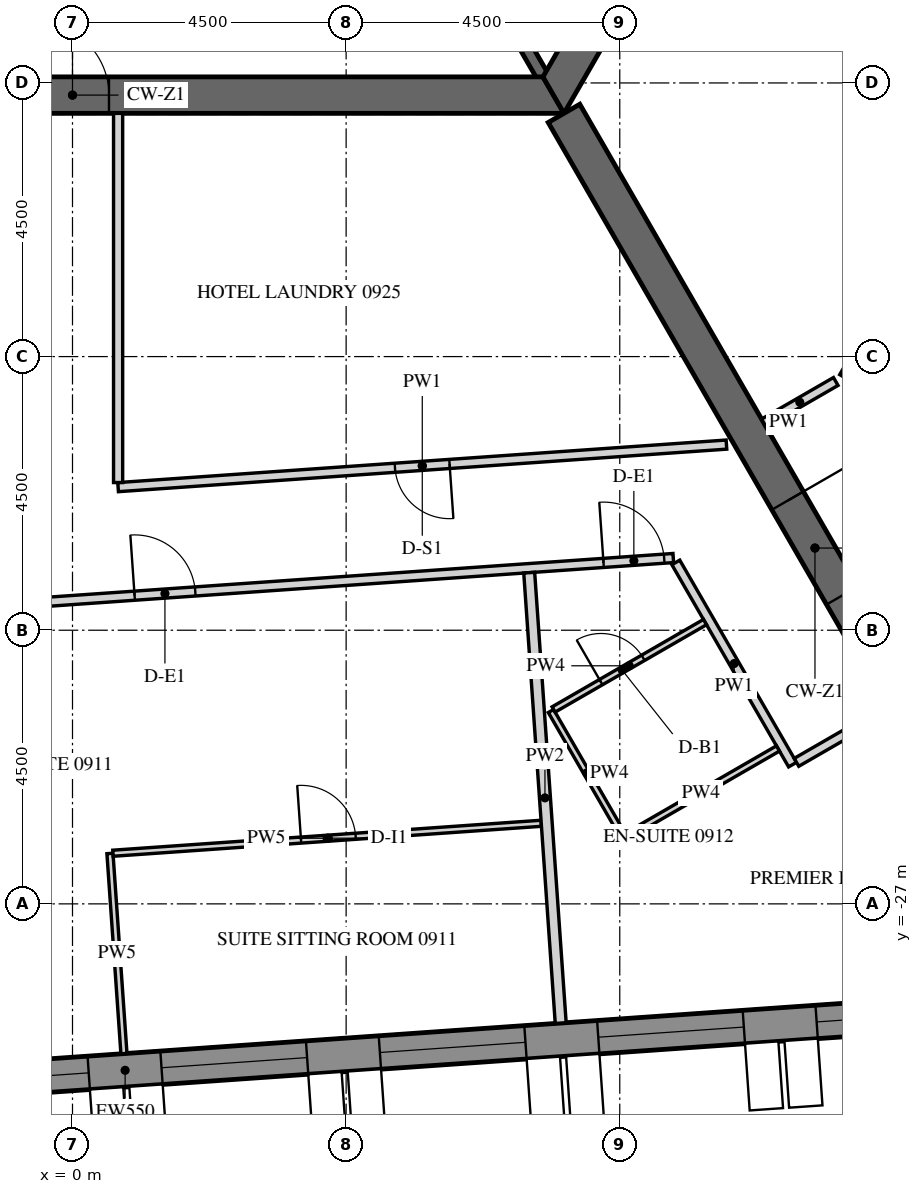
"""IFC4 building model, lengths in metres.
Left out: names, types, materials, properties, quantities, classifications, styles, units other than length and angle.
Written with IfcOpenShell. Run it as: python <this file> out.ifc"""

import sys

from ifc_helpers import new_model, si_unit, direction, frame, frame_2d, origin, place, context, subcontext, project, spatial, polyline, rectangle, outline, extrude, element, fill, save


model = new_model("IFC4")
c1 = context("Model", 3, precision=1e-05, world=origin(), true_north=direction((0.0, 1.0)))
c2 = subcontext(c1, "Body", "Model", "MODEL_VIEW")
j1 = project(units=[si_unit("LENGTHUNIT", "METRE"), si_unit("PLANEANGLEUNIT", "RADIAN")], contexts=[c1])
p1 = place(None, origin())
s1 = spatial("IfcSite", under=j1, at=p1, CompositionType="ELEMENT")
p2 = place(p1, origin())
s2 = spatial("IfcBuilding", under=s1, at=p2, CompositionType="ELEMENT")
p3 = place(p2, frame((0.0, 0.0, 123.3)))
s3 = spatial("IfcBuildingStorey", under=s2, at=p3, CompositionType="ELEMENT", Elevation=123.3)
p4 = place(p3, frame((-14.134, -30.786, -0.15), z_axis=(0.0, 0.0, 1.0), x_axis=(0.997564037441, 0.069756657061, 0.0)))
e1 = element("IfcWall", 1, at=p4, inside=s3, PredefinedType="SOLIDWALL", context=c2, shape_type="SweptSolid", body=[
    extrude(outline(polyline([(-0.026, -0.275), (30.094, -0.275), (30.049, 0.275), (0.026, 0.275), (-0.026, -0.275)])), origin(), (0.0, 0.0, 1.0), 3.9),
])
p5 = place(p4, frame((1.236, 0.0, 1.05)))
e2 = element("IfcOpeningElement", 2, at=p5, cuts=e1, PredefinedType="OPENING", context=c2, shape_type="SweptSolid", body=[
    extrude(rectangle(XDim=2.4, YDim=2.4, at=frame_2d((1.2, 1.2))), frame((0.0, 0.285, 0.0), z_axis=(0.0, -1.0, 0.0), x_axis=(1.0, 0.0, 0.0)), (0.0, 0.0, 1.0), 0.57),
])
p6 = place(p4, frame((4.835, 0.0, 1.05)))
e3 = element("IfcOpeningElement", 3, at=p6, cuts=e1, PredefinedType="OPENING", context=c2, shape_type="SweptSolid", body=[
    extrude(rectangle(XDim=2.4, YDim=2.4, at=frame_2d((1.2, 1.2))), frame((0.0, 0.285, 0.0), z_axis=(0.0, -1.0, 0.0), x_axis=(1.0, 0.0, 0.0)), (0.0, 0.0, 1.0), 0.57),
])
p7 = place(p4, frame((8.436, 0.0, 1.05)))
e4 = element("IfcOpeningElement", 4, at=p7, cuts=e1, PredefinedType="OPENING", context=c2, shape_type="SweptSolid", body=[
    extrude(rectangle(XDim=2.4, YDim=2.4, at=frame_2d((1.2, 1.2))), frame((0.0, 0.285, 0.0), z_axis=(0.0, -1.0, 0.0), x_axis=(1.0, 0.0, 0.0)), (0.0, 0.0, 1.0), 0.57),
])
p8 = place(p4, frame((12.035, 0.0, 1.05)))
e5 = element("IfcOpeningElement", 5, at=p8, cuts=e1, PredefinedType="OPENING", context=c2, shape_type="SweptSolid", body=[
    extrude(rectangle(XDim=2.4, YDim=2.4, at=frame_2d((1.2, 1.2))), frame((0.0, 0.285, 0.0), z_axis=(0.0, -1.0, 0.0), x_axis=(1.0, 0.0, 0.0)), (0.0, 0.0, 1.0), 0.57),
])
p9 = place(p4, frame((15.635, 0.0, 1.05)))
e6 = element("IfcOpeningElement", 6, at=p9, cuts=e1, PredefinedType="OPENING", context=c2, shape_type="SweptSolid", body=[
    extrude(rectangle(XDim=2.4, YDim=2.4, at=frame_2d((1.2, 1.2))), frame((0.0, 0.285, 0.0), z_axis=(0.0, -1.0, 0.0), x_axis=(1.0, 0.0, 0.0)), (0.0, 0.0, 1.0), 0.57),
])
p10 = place(p4, frame((19.236, 0.0, 1.05)))
e7 = element("IfcOpeningElement", 7, at=p10, cuts=e1, PredefinedType="OPENING", context=c2, shape_type="SweptSolid", body=[
    extrude(rectangle(XDim=2.4, YDim=2.4, at=frame_2d((1.2, 1.2))), frame((0.0, 0.285, 0.0), z_axis=(0.0, -1.0, 0.0), x_axis=(1.0, 0.0, 0.0)), (0.0, 0.0, 1.0), 0.57),
])
p11 = place(p4, frame((22.835, 0.0, 1.05)))
e8 = element("IfcOpeningElement", 8, at=p11, cuts=e1, PredefinedType="OPENING", context=c2, shape_type="SweptSolid", body=[
    extrude(rectangle(XDim=2.4, YDim=2.4, at=frame_2d((1.2, 1.2))), frame((0.0, 0.285, 0.0), z_axis=(0.0, -1.0, 0.0), x_axis=(1.0, 0.0, 0.0)), (0.0, 0.0, 1.0), 0.57),
])
p12 = place(p4, frame((26.436, 0.0, 1.05)))
e9 = element("IfcOpeningElement", 9, at=p12, cuts=e1, PredefinedType="OPENING", context=c2, shape_type="SweptSolid", body=[
    extrude(rectangle(XDim=2.4, YDim=2.4, at=frame_2d((1.2, 1.2))), frame((0.0, 0.285, 0.0), z_axis=(0.0, -1.0, 0.0), x_axis=(1.0, 0.0, 0.0)), (0.0, 0.0, 1.0), 0.57),
])
p13 = place(p3, frame((-7.91, -13.7, -0.15), z_axis=(0.0, 0.0, 1.0), x_axis=(1.0, 0.0, 0.0)))
e10 = element("IfcWall", 10, at=p13, inside=s3, PredefinedType="SHEAR", context=c2, shape_type="SweptSolid", body=[
    extrude(outline(polyline([(-0.173, -0.3), (15.993, -0.3), (15.646, 0.3), (0.173, 0.3), (-0.173, -0.3)])), origin(), (0.0, 0.0, 1.0), 3.9),
])
p14 = place(p13, frame((7.31, 0.0, 0.15)))
e11 = element("IfcOpeningElement", 11, at=p14, cuts=e10, PredefinedType="OPENING", context=c2, shape_type="SweptSolid", body=[
    extrude(rectangle(XDim=1.2, YDim=2.4, at=frame_2d((0.6, 1.2))), frame((0.0, 0.31, 0.0), z_axis=(0.0, -1.0, 0.0), x_axis=(1.0, 0.0, 0.0)), (0.0, 0.0, 1.0), 0.62),
])
p15 = place(p3, frame((7.91, -13.7, -0.15), z_axis=(0.0, 0.0, 1.0), x_axis=(0.499999880136, 0.866025472988, 0.0)))
e12 = element("IfcWall", 12, at=p15, inside=s3, PredefinedType="SHEAR", context=c2, shape_type="SweptSolid", body=[
    extrude(outline(polyline([(-0.173, -0.3), (15.993, -0.3), (15.646, 0.3), (0.173, 0.3), (-0.173, -0.3)])), origin(), (0.0, 0.0, 1.0), 3.9),
])
p16 = place(p15, frame((7.039, 0.0, 0.15)))
e13 = element("IfcOpeningElement", 13, at=p16, cuts=e12, PredefinedType="OPENING", context=c2, shape_type="SweptSolid", body=[
    extrude(rectangle(XDim=1.8, YDim=2.4, at=frame_2d((0.9, 1.2))), frame((0.0, 0.31, 0.0), z_axis=(0.0, -1.0, 0.0), x_axis=(1.0, 0.0, 0.0)), (0.0, 0.0, 1.0), 0.62),
])
p17 = place(p3, frame((8.083, -14.0, -0.15), z_axis=(0.0, 0.0, 1.0), x_axis=(0.499997680643, -0.866026742862, 0.0)))
e14 = element("IfcWall", 14, at=p17, inside=s3, PredefinedType="SHEAR", context=c2, shape_type="SweptSolid", body=[
    extrude(rectangle(XDim=16.509, YDim=0.6, at=frame_2d((8.254, 0.0))), origin(), (0.0, 0.0, 1.0), 3.9),
])
p18 = place(p17, frame((7.354, 0.0, 0.15)))
e15 = element("IfcOpeningElement", 15, at=p18, cuts=e14, PredefinedType="OPENING", context=c2, shape_type="SweptSolid", body=[
    extrude(rectangle(XDim=1.8, YDim=2.4, at=frame_2d((0.9, 1.2))), frame((0.0, 0.31, 0.0), z_axis=(0.0, -1.0, 0.0), x_axis=(1.0, 0.0, 0.0)), (0.0, 0.0, 1.0), 0.62),
])
p19 = place(p3, frame((5.773, -10.0, -0.15), z_axis=(0.0, 0.0, 1.0), x_axis=(0.500038251005, -0.86600331843, 0.0)))
e16 = element("IfcWall", 16, at=p19, inside=s3, PredefinedType="SHEAR", context=c2, shape_type="SweptSolid", body=[
    extrude(rectangle(XDim=3.926, YDim=0.2, at=frame_2d((1.963, 0.0))), origin(), (0.0, 0.0, 1.0), 3.9),
])
p20 = place(p3, frame((-12.068, -22.847, 0.0), z_axis=(0.0, 0.0, 1.0), x_axis=(0.99756437486, 0.069751831595, 0.0)))
e17 = element("IfcWall", 17, at=p20, inside=s3, PredefinedType="PARTITIONING", context=c2, shape_type="SweptSolid", body=[
    extrude(rectangle(XDim=22.002, YDim=0.15, at=frame_2d((11.001, 0.0))), origin(), (0.0, 0.0, 1.0), 2.988),
])
p21 = place(p20, frame((3.169, 0.0, 0.0)))
e18 = element("IfcOpeningElement", 18, at=p21, cuts=e17, PredefinedType="OPENING", context=c2, shape_type="SweptSolid", body=[
    extrude(rectangle(XDim=1.0, YDim=2.1, at=frame_2d((0.5, 1.05))), frame((0.0, 0.085, 0.0), z_axis=(0.0, -1.0, 0.0), x_axis=(1.0, 0.0, 0.0)), (0.0, 0.0, 1.0), 0.17),
])
p22 = place(p20, frame((13.121, 0.0, 0.0)))
e19 = element("IfcOpeningElement", 19, at=p22, cuts=e17, PredefinedType="OPENING", context=c2, shape_type="SweptSolid", body=[
    extrude(rectangle(XDim=1.0, YDim=2.1, at=frame_2d((0.5, 1.05))), frame((0.0, 0.085, 0.0), z_axis=(0.0, -1.0, 0.0), x_axis=(1.0, 0.0, 0.0)), (0.0, 0.0, 1.0), 0.17),
])
p23 = place(p20, frame((20.852, 0.0, 0.0)))
e20 = element("IfcOpeningElement", 20, at=p23, cuts=e17, PredefinedType="OPENING", context=c2, shape_type="SweptSolid", body=[
    extrude(rectangle(XDim=1.0, YDim=2.1, at=frame_2d((0.5, 1.05))), frame((0.0, 0.085, 0.0), z_axis=(0.0, -1.0, 0.0), x_axis=(1.0, 0.0, 0.0)), (0.0, 0.0, 1.0), 0.17),
])
p24 = place(p3, frame((9.922, -21.385, 0.0), z_axis=(0.0, 0.0, 1.0), x_axis=(0.500003180287, -0.866023567637, 0.0)))
e21 = element("IfcWall", 21, at=p24, inside=s3, PredefinedType="PARTITIONING", context=c2, shape_type="SweptSolid", body=[
    extrude(rectangle(XDim=3.839, YDim=0.15, at=frame_2d((1.92, 0.0))), origin(), (0.0, 0.0, 1.0), 2.988),
])
p25 = place(p3, frame((11.906, -24.673, 0.0), z_axis=(0.0, 0.0, 1.0), x_axis=(0.866013532718, 0.500020560727, 0.0)))
e22 = element("IfcWall", 22, at=p25, inside=s3, PredefinedType="PARTITIONING", context=c2, shape_type="SweptSolid", body=[
    extrude(rectangle(XDim=1.725, YDim=0.15, at=frame_2d((0.863, 0.0))), origin(), (0.0, 0.0, 1.0), 2.988),
])
p26 = place(p3, frame((10.754, -19.447, 0.0), z_axis=(0.0, 0.0, 1.0), x_axis=(-0.997564830966, -0.069745308232, 0.0)))
e23 = element("IfcWall", 23, at=p26, inside=s3, PredefinedType="PARTITIONING", context=c2, shape_type="SweptSolid", body=[
    extrude(rectangle(XDim=10.029, YDim=0.15, at=frame_2d((5.014, 0.0))), origin(), (0.0, 0.0, 1.0), 2.988),
])
p27 = place(p26, frame((4.564, 0.0, 0.0)))
e24 = element("IfcOpeningElement", 24, at=p27, cuts=e23, PredefinedType="OPENING", context=c2, shape_type="SweptSolid", body=[
    extrude(rectangle(XDim=0.9, YDim=2.1, at=frame_2d((0.45, 1.05))), frame((0.0, 0.085, 0.0), z_axis=(0.0, -1.0, 0.0), x_axis=(1.0, 0.0, 0.0)), (0.0, 0.0, 1.0), 0.17),
])
p28 = place(p3, frame((0.75, -20.072, 0.0), z_axis=(0.0, 0.0, 1.0), x_axis=(0.0, 1.0, 0.0)))
e25 = element("IfcWall", 25, at=p28, inside=s3, PredefinedType="PARTITIONING", context=c2, shape_type="SweptSolid", body=[
    extrude(rectangle(XDim=6.072, YDim=0.15, at=frame_2d((3.036, 0.0))), origin(), (0.0, 0.0, 1.0), 2.988),
])
p29 = place(p3, frame((16.902, -11.024, 0.0), z_axis=(0.0, 0.0, 1.0), x_axis=(-0.499999527968, -0.866025676312, 0.0)))
e26 = element("IfcWall", 26, at=p29, inside=s3, PredefinedType="PARTITIONING", context=c2, shape_type="SweptSolid", body=[
    extrude(rectangle(XDim=8.441, YDim=0.15, at=frame_2d((4.22, 0.0))), origin(), (0.0, 0.0, 1.0), 2.988),
])
p30 = place(p29, frame((3.771, 0.0, 0.0)))
e27 = element("IfcOpeningElement", 27, at=p30, cuts=e26, PredefinedType="OPENING", context=c2, shape_type="SweptSolid", body=[
    extrude(rectangle(XDim=0.9, YDim=2.1, at=frame_2d((0.45, 1.05))), frame((0.0, 0.085, 0.0), z_axis=(0.0, -1.0, 0.0), x_axis=(1.0, 0.0, 0.0)), (0.0, 0.0, 1.0), 0.17),
])
p31 = place(p3, frame((12.552, -18.409, 0.0), z_axis=(0.0, 0.0, 1.0), x_axis=(-0.866078408764, -0.499908181442, 0.0)))
e28 = element("IfcWall", 28, at=p31, inside=s3, PredefinedType="PARTITIONING", context=c2, shape_type="SweptSolid", body=[
    extrude(rectangle(XDim=1.365, YDim=0.15, at=frame_2d((0.683, 0.0))), origin(), (0.0, 0.0, 1.0), 2.988),
])
p32 = place(p3, frame((0.846, -29.463, 0.0), z_axis=(0.0, 0.0, 1.0), x_axis=(-0.069769490542, 0.997563139951, 0.0)))
e29 = element("IfcWall", 29, at=p32, inside=s3, PredefinedType="PARTITIONING", context=c2, shape_type="SweptSolid", body=[
    extrude(rectangle(XDim=3.3, YDim=0.1, at=frame_2d((1.65, 0.0))), origin(), (0.0, 0.0, 1.0), 2.988),
])
p33 = place(p3, frame((0.666, -26.167, 0.0), z_axis=(0.0, 0.0, 1.0), x_axis=(0.997564648601, 0.069747916536, 0.0)))
e30 = element("IfcWall", 30, at=p33, inside=s3, PredefinedType="PARTITIONING", context=c2, shape_type="SweptSolid", body=[
    extrude(rectangle(XDim=7.06, YDim=0.1, at=frame_2d((3.53, 0.0))), origin(), (0.0, 0.0, 1.0), 2.988),
])
p34 = place(p33, frame((3.1, 0.0, 0.0)))
e31 = element("IfcOpeningElement", 31, at=p34, cuts=e30, PredefinedType="OPENING", context=c2, shape_type="SweptSolid", body=[
    extrude(rectangle(XDim=0.9, YDim=2.1, at=frame_2d((0.45, 1.05))), frame((0.0, 0.06, 0.0), z_axis=(0.0, -1.0, 0.0), x_axis=(1.0, 0.0, 0.0)), (0.0, 0.0, 1.0), 0.12),
])
p35 = place(p3, frame((8.029, -28.96, 0.0), z_axis=(0.0, 0.0, 1.0), x_axis=(-0.069739801019, 0.99756521599, 0.0)))
e32 = element("IfcWall", 32, at=p35, inside=s3, PredefinedType="PARTITIONING", context=c2, shape_type="SweptSolid", body=[
    extrude(rectangle(XDim=7.425, YDim=0.18, at=frame_2d((3.712, 0.0))), origin(), (0.0, 0.0, 1.0), 2.988),
])
p36 = place(p3, frame((11.602, -24.445, 0.0), z_axis=(0.0, 0.0, 1.0), x_axis=(-0.866046596414, -0.499963291492, 0.0)))
e33 = element("IfcWall", 33, at=p36, inside=s3, PredefinedType="PARTITIONING", context=c2, shape_type="SweptSolid", body=[
    extrude(rectangle(XDim=2.925, YDim=0.1, at=frame_2d((1.462, 0.0))), origin(), (0.0, 0.0, 1.0), 2.988),
])
p37 = place(p3, frame((9.043, -25.864, 0.0), z_axis=(0.0, 0.0, 1.0), x_axis=(-0.500016218704, 0.866016039709, 0.0)))
e34 = element("IfcWall", 34, at=p37, inside=s3, PredefinedType="PARTITIONING", context=c2, shape_type="SweptSolid", body=[
    extrude(rectangle(XDim=2.35, YDim=0.1, at=frame_2d((1.175, 0.0))), origin(), (0.0, 0.0, 1.0), 2.988),
])
p38 = place(p3, frame((7.912, -23.803, 0.0), z_axis=(0.0, 0.0, 1.0), x_axis=(0.866039941686, 0.499974818771, 0.0)))
e35 = element("IfcWall", 35, at=p38, inside=s3, PredefinedType="PARTITIONING", context=c2, shape_type="SweptSolid", body=[
    extrude(rectangle(XDim=2.875, YDim=0.1, at=frame_2d((1.438, 0.0))), origin(), (0.0, 0.0, 1.0), 2.988),
])
p39 = place(p38, frame((0.9, 0.0, 0.0)))
e36 = element("IfcOpeningElement", 36, at=p39, cuts=e35, PredefinedType="OPENING", context=c2, shape_type="SweptSolid", body=[
    extrude(rectangle(XDim=0.8, YDim=2.1, at=frame_2d((0.4, 1.05))), frame((0.0, 0.06, 0.0), z_axis=(0.0, -1.0, 0.0), x_axis=(1.0, 0.0, 0.0)), (0.0, 0.0, 1.0), 0.12),
])
p40 = place(p8, frame((0.0, 0.205, 0.0)))
e37 = element("IfcWindow", 37, at=p40, inside=s3, PartitioningType="DOUBLE_PANEL_VERTICAL", PredefinedType="WINDOW", context=c2, shape_type="SweptSolid", body=[
    extrude(rectangle(XDim=2.4, YDim=2.4, at=frame_2d((1.2, 1.2))), frame((0.0, 0.03, 0.0), z_axis=(0.0, -1.0, 0.0), x_axis=(1.0, 0.0, 0.0)), (0.0, 0.0, 1.0), 0.06),
])
fill(e5, e37)
p41 = place(p9, frame((0.0, 0.205, 0.0)))
e38 = element("IfcWindow", 38, at=p41, inside=s3, PartitioningType="DOUBLE_PANEL_VERTICAL", PredefinedType="WINDOW", context=c2, shape_type="SweptSolid", body=[
    extrude(rectangle(XDim=2.4, YDim=2.4, at=frame_2d((1.2, 1.2))), frame((0.0, 0.03, 0.0), z_axis=(0.0, -1.0, 0.0), x_axis=(1.0, 0.0, 0.0)), (0.0, 0.0, 1.0), 0.06),
])
fill(e6, e38)
p42 = place(p10, frame((0.0, 0.205, 0.0)))
e39 = element("IfcWindow", 39, at=p42, inside=s3, PartitioningType="DOUBLE_PANEL_VERTICAL", PredefinedType="WINDOW", context=c2, shape_type="SweptSolid", body=[
    extrude(rectangle(XDim=2.4, YDim=2.4, at=frame_2d((1.2, 1.2))), frame((0.0, 0.03, 0.0), z_axis=(0.0, -1.0, 0.0), x_axis=(1.0, 0.0, 0.0)), (0.0, 0.0, 1.0), 0.06),
])
fill(e7, e39)
p43 = place(p11, frame((0.0, 0.205, 0.0)))
e40 = element("IfcWindow", 40, at=p43, inside=s3, PartitioningType="DOUBLE_PANEL_VERTICAL", PredefinedType="WINDOW", context=c2, shape_type="SweptSolid", body=[
    extrude(rectangle(XDim=2.4, YDim=2.4, at=frame_2d((1.2, 1.2))), frame((0.0, 0.03, 0.0), z_axis=(0.0, -1.0, 0.0), x_axis=(1.0, 0.0, 0.0)), (0.0, 0.0, 1.0), 0.06),
])
fill(e8, e40)
p44 = place(p12, frame((0.0, 0.205, 0.0)))
e41 = element("IfcWindow", 41, at=p44, inside=s3, PartitioningType="DOUBLE_PANEL_VERTICAL", PredefinedType="WINDOW", context=c2, shape_type="SweptSolid", body=[
    extrude(rectangle(XDim=2.4, YDim=2.4, at=frame_2d((1.2, 1.2))), frame((0.0, 0.03, 0.0), z_axis=(0.0, -1.0, 0.0), x_axis=(1.0, 0.0, 0.0)), (0.0, 0.0, 1.0), 0.06),
])
fill(e9, e41)
p45 = place(p14, origin())
e42 = element("IfcDoor", 42, at=p45, inside=s3, OperationType="SINGLE_SWING_LEFT", PredefinedType="DOOR", context=c2, shape_type="SweptSolid", body=[
    extrude(rectangle(XDim=1.2, YDim=2.4, at=frame_2d((0.6, 1.2))), frame((0.0, 0.025, 0.0), z_axis=(0.0, -1.0, 0.0), x_axis=(1.0, 0.0, 0.0)), (0.0, 0.0, 1.0), 0.05),
])
fill(e11, e42)
p46 = place(p18, origin())
e43 = element("IfcDoor", 43, at=p46, inside=s3, OperationType="DOUBLE_DOOR_SINGLE_SWING", PredefinedType="DOOR", context=c2, shape_type="SweptSolid", body=[
    extrude(rectangle(XDim=1.8, YDim=2.4, at=frame_2d((0.9, 1.2))), frame((0.0, 0.025, 0.0), z_axis=(0.0, -1.0, 0.0), x_axis=(1.0, 0.0, 0.0)), (0.0, 0.0, 1.0), 0.05),
])
fill(e15, e43)
p47 = place(p22, origin())
e44 = element("IfcDoor", 44, at=p47, inside=s3, OperationType="SINGLE_SWING_RIGHT", PredefinedType="DOOR", context=c2, shape_type="SweptSolid", body=[
    extrude(rectangle(XDim=1.0, YDim=2.1, at=frame_2d((0.5, 1.05))), frame((0.0, 0.025, 0.0), z_axis=(0.0, -1.0, 0.0), x_axis=(1.0, 0.0, 0.0)), (0.0, 0.0, 1.0), 0.05),
])
fill(e19, e44)
p48 = place(p34, origin())
e45 = element("IfcDoor", 45, at=p48, inside=s3, OperationType="SINGLE_SWING_LEFT", PredefinedType="DOOR", context=c2, shape_type="SweptSolid", body=[
    extrude(rectangle(XDim=0.9, YDim=2.1, at=frame_2d((0.45, 1.05))), frame((0.0, 0.025, 0.0), z_axis=(0.0, -1.0, 0.0), x_axis=(1.0, 0.0, 0.0)), (0.0, 0.0, 1.0), 0.05),
])
fill(e31, e45)
p49 = place(p23, origin())
e46 = element("IfcDoor", 46, at=p49, inside=s3, OperationType="SINGLE_SWING_LEFT", PredefinedType="DOOR", context=c2, shape_type="SweptSolid", body=[
    extrude(rectangle(XDim=1.0, YDim=2.1, at=frame_2d((0.5, 1.05))), frame((0.0, 0.025, 0.0), z_axis=(0.0, -1.0, 0.0), x_axis=(1.0, 0.0, 0.0)), (0.0, 0.0, 1.0), 0.05),
])
fill(e20, e46)
p50 = place(p39, origin())
e47 = element("IfcDoor", 47, at=p50, inside=s3, OperationType="SINGLE_SWING_RIGHT", PredefinedType="DOOR", context=c2, shape_type="SweptSolid", body=[
    extrude(rectangle(XDim=0.8, YDim=2.1, at=frame_2d((0.4, 1.05))), frame((0.0, 0.025, 0.0), z_axis=(0.0, -1.0, 0.0), x_axis=(1.0, 0.0, 0.0)), (0.0, 0.0, 1.0), 0.05),
])
fill(e36, e47)
p51 = place(p27, origin())
e48 = element("IfcDoor", 48, at=p51, inside=s3, OperationType="SINGLE_SWING_LEFT", PredefinedType="DOOR", context=c2, shape_type="SweptSolid", body=[
    extrude(rectangle(XDim=0.9, YDim=2.1, at=frame_2d((0.45, 1.05))), frame((0.0, 0.025, 0.0), z_axis=(0.0, -1.0, 0.0), x_axis=(1.0, 0.0, 0.0)), (0.0, 0.0, 1.0), 0.05),
])
fill(e24, e48)
save(model, sys.argv[1])
